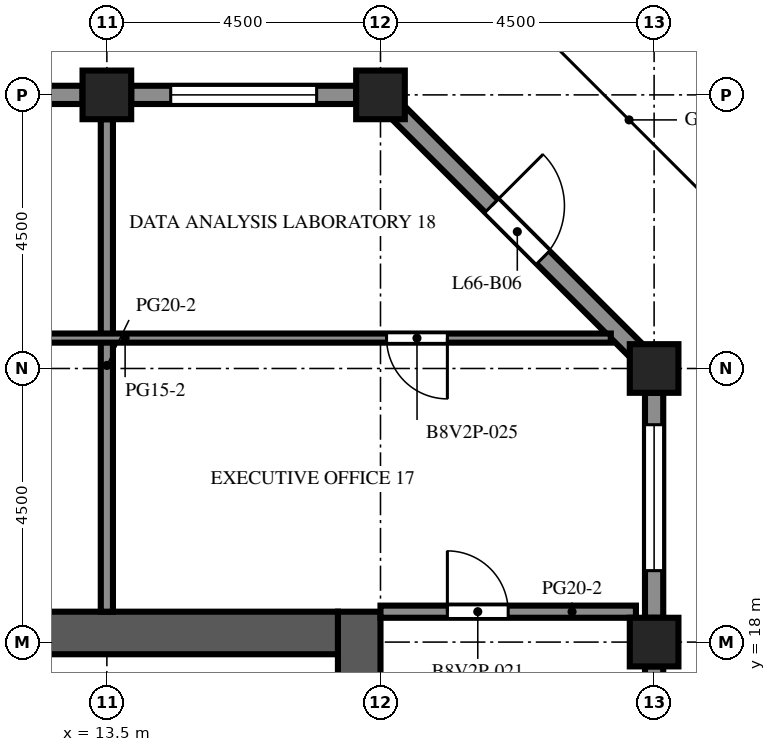
"""IFC4 building model, lengths in metres.
Left out: names, types, materials, properties, quantities, classifications, styles, units other than length and angle.
Written with IfcOpenShell. Run it as: python <this file> out.ifc"""

import sys

from ifc_helpers import new_model, si_unit, direction, frame, frame_2d, origin, origin_2d, place, context, subcontext, project, spatial, rectangle, extrude, element, fill, save


model = new_model("IFC4")
c1 = context("Model", 3, precision=1e-05, world=origin(), true_north=direction((0.0, 1.0)))
c2 = subcontext(c1, "Body", "Model", "MODEL_VIEW")
j1 = project(units=[si_unit("LENGTHUNIT", "METRE"), si_unit("PLANEANGLEUNIT", "RADIAN")], contexts=[c1])
p1 = place(None, origin())
s1 = spatial("IfcSite", under=j1, at=p1, CompositionType="ELEMENT")
p2 = place(p1, origin())
s2 = spatial("IfcBuilding", under=s1, at=p2, CompositionType="ELEMENT")
p3 = place(p2, frame((0.0, 0.0, 290.9)))
s3 = spatial("IfcBuildingStorey", under=s2, at=p3, CompositionType="ELEMENT", Elevation=290.9)
for number, where, z_axis, x_axis in (
    (1, (13.5, 27.0, 0.0), (0.0, 0.0, 1.0), (1.0, 0.0, 0.0)),
    (2, (18.0, 27.0, 0.0), (0.0, 0.0, 1.0), (1.0, 0.0, 0.0)),
    (3, (22.5, 18.0, 0.0), (0.0, 0.0, 1.0), (1.0, 0.0, 0.0)),
    (4, (22.5, 22.5, 0.0), (0.0, 0.0, 1.0), (1.0, 0.0, 0.0)),
):
    element("IfcColumn", number, at=place(p3, frame(where, z_axis=z_axis, x_axis=x_axis)), inside=s3, PredefinedType="COLUMN", context=c2, shape_type="SweptSolid", body=[
        extrude(rectangle(XDim=0.8, YDim=0.8, at=origin_2d()), origin(), (0.0, 0.0, 1.0), 4.1),
    ])
p4 = place(p3, frame((17.65, -9.0, 0.0), z_axis=(0.0, 0.0, 1.0), x_axis=(0.0, 1.0, 0.0)))
e5 = element("IfcWall", 5, at=p4, inside=s3, PredefinedType="SHEAR", context=c2, shape_type="SweptSolid", body=[
    extrude(rectangle(XDim=27.5, YDim=0.7, at=frame_2d((13.75, 0.0))), origin(), (0.0, 0.0, 1.0), 4.1),
])
p5 = place(p4, frame((12.55, 0.0, 0.0)))
e6 = element("IfcOpeningElement", 6, at=p5, cuts=e5, PredefinedType="OPENING", context=c2, shape_type="SweptSolid", body=[
    extrude(rectangle(XDim=2.4, YDim=2.4, at=frame_2d((1.2, 1.2))), frame((0.0, 0.36, 0.0), z_axis=(0.0, -1.0, 0.0), x_axis=(1.0, 0.0, 0.0)), (0.0, 0.0, 1.0), 0.72),
])
p6 = place(p4, frame((6.825, 0.0, 0.0)))
e7 = element("IfcOpeningElement", 7, at=p6, cuts=e5, PredefinedType="OPENING", context=c2, shape_type="SweptSolid", body=[
    extrude(rectangle(XDim=1.2, YDim=2.1, at=frame_2d((0.6, 1.05))), frame((0.0, 0.36, 0.0), z_axis=(0.0, -1.0, 0.0), x_axis=(1.0, 0.0, 0.0)), (0.0, 0.0, 1.0), 0.72),
])
p7 = place(p4, frame((19.475, 0.0, 0.0)))
e8 = element("IfcOpeningElement", 8, at=p7, cuts=e5, PredefinedType="OPENING", context=c2, shape_type="SweptSolid", body=[
    extrude(rectangle(XDim=1.2, YDim=2.1, at=frame_2d((0.6, 1.05))), frame((0.0, 0.36, 0.0), z_axis=(0.0, -1.0, 0.0), x_axis=(1.0, 0.0, 0.0)), (0.0, 0.0, 1.0), 0.72),
])
p8 = place(p3, frame((6.7, 18.15, 0.0), z_axis=(0.0, 0.0, 1.0), x_axis=(1.0, 0.0, 0.0)))
e9 = element("IfcWall", 9, at=p8, inside=s3, PredefinedType="SHEAR", context=c2, shape_type="SweptSolid", body=[
    extrude(rectangle(XDim=10.6, YDim=0.7, at=frame_2d((5.3, 0.0))), origin(), (0.0, 0.0, 1.0), 4.1),
])
p9 = place(p3, frame((22.5, 17.6, 0.0), z_axis=(0.0, 0.0, 1.0), x_axis=(0.0, -1.0, 0.0)))
e10 = element("IfcWall", 10, at=p9, inside=s3, PredefinedType="SOLIDWALL", context=c2, shape_type="SweptSolid", body=[
    extrude(rectangle(XDim=3.7, YDim=0.3, at=frame_2d((1.85, 0.0))), origin(), (0.0, 0.0, 1.0), 2.7),
])
p10 = place(p9, frame((1.35, 0.0, 0.0)))
e11 = element("IfcOpeningElement", 11, at=p10, cuts=e10, PredefinedType="OPENING", context=c2, shape_type="SweptSolid", body=[
    extrude(rectangle(XDim=1.0, YDim=2.2, at=frame_2d((0.5, 1.1))), frame((0.0, 0.16, 0.0), z_axis=(0.0, -1.0, 0.0), x_axis=(1.0, 0.0, 0.0)), (0.0, 0.0, 1.0), 0.32),
])
p11 = place(p3, frame((22.5, 22.1, 0.0), z_axis=(0.0, 0.0, 1.0), x_axis=(0.0, -1.0, 0.0)))
e12 = element("IfcWall", 12, at=p11, inside=s3, PredefinedType="SOLIDWALL", context=c2, shape_type="SweptSolid", body=[
    extrude(rectangle(XDim=3.7, YDim=0.3, at=frame_2d((1.85, 0.0))), origin(), (0.0, 0.0, 1.0), 2.7),
])
p12 = place(p11, frame((0.525, 0.0, 0.8)))
e13 = element("IfcOpeningElement", 13, at=p12, cuts=e12, PredefinedType="OPENING", context=c2, shape_type="SweptSolid", body=[
    extrude(rectangle(XDim=2.4, YDim=1.7, at=frame_2d((1.2, 0.85))), frame((0.0, 0.16, 0.0), z_axis=(0.0, -1.0, 0.0), x_axis=(1.0, 0.0, 0.0)), (0.0, 0.0, 1.0), 0.32),
])
p13 = place(p3, frame((18.294, 26.706, 0.0), z_axis=(0.0, 0.0, 1.0), x_axis=(0.707106781187, -0.707106781187, 0.0)))
e14 = element("IfcWall", 14, at=p13, inside=s3, PredefinedType="SOLIDWALL", context=c2, shape_type="SweptSolid", body=[
    extrude(rectangle(XDim=5.532, YDim=0.3, at=frame_2d((2.766, 0.0))), origin(), (0.0, 0.0, 1.0), 2.7),
])
p14 = place(p13, frame((2.166, 0.0, 0.0)))
e15 = element("IfcOpeningElement", 15, at=p14, cuts=e14, PredefinedType="OPENING", context=c2, shape_type="SweptSolid", body=[
    extrude(rectangle(XDim=1.2, YDim=2.2, at=frame_2d((0.6, 1.1))), frame((0.0, 0.16, 0.0), z_axis=(0.0, -1.0, 0.0), x_axis=(1.0, 0.0, 0.0)), (0.0, 0.0, 1.0), 0.32),
])
p15 = place(p3, frame((13.9, 27.0, 0.0), z_axis=(0.0, 0.0, 1.0), x_axis=(1.0, 0.0, 0.0)))
e16 = element("IfcWall", 16, at=p15, inside=s3, PredefinedType="SOLIDWALL", context=c2, shape_type="SweptSolid", body=[
    extrude(rectangle(XDim=3.7, YDim=0.3, at=frame_2d((1.85, 0.0))), origin(), (0.0, 0.0, 1.0), 2.7),
])
p16 = place(p15, frame((0.65, 0.0, 0.8)))
e17 = element("IfcOpeningElement", 17, at=p16, cuts=e16, PredefinedType="OPENING", context=c2, shape_type="SweptSolid", body=[
    extrude(rectangle(XDim=2.4, YDim=1.7, at=frame_2d((1.2, 0.85))), frame((0.0, 0.16, 0.0), z_axis=(0.0, -1.0, 0.0), x_axis=(1.0, 0.0, 0.0)), (0.0, 0.0, 1.0), 0.32),
])
p17 = place(p3, frame((9.4, 27.0, 0.0), z_axis=(0.0, 0.0, 1.0), x_axis=(1.0, 0.0, 0.0)))
e18 = element("IfcWall", 18, at=p17, inside=s3, PredefinedType="SOLIDWALL", context=c2, shape_type="SweptSolid", body=[
    extrude(rectangle(XDim=3.7, YDim=0.3, at=frame_2d((1.85, 0.0))), origin(), (0.0, 0.0, 1.0), 2.7),
])
p18 = place(p17, frame((1.35, 0.0, 0.0)))
e19 = element("IfcOpeningElement", 19, at=p18, cuts=e18, PredefinedType="OPENING", context=c2, shape_type="SweptSolid", body=[
    extrude(rectangle(XDim=1.0, YDim=2.2, at=frame_2d((0.5, 1.1))), frame((0.0, 0.16, 0.0), z_axis=(0.0, -1.0, 0.0), x_axis=(1.0, 0.0, 0.0)), (0.0, 0.0, 1.0), 0.32),
])
p19 = place(p3, frame((13.5, 18.5, 0.0), z_axis=(0.0, 0.0, 1.0), x_axis=(0.0, 1.0, 0.0)))
e20 = element("IfcWall", 20, at=p19, inside=s3, PredefinedType="PARTITIONING", context=c2, shape_type="SweptSolid", body=[
    extrude(rectangle(XDim=8.1, YDim=0.2, at=frame_2d((4.05, 0.0))), origin(), (0.0, 0.0, 1.0), 3.5),
])
p20 = place(p3, frame((18.0, 18.5, 0.0), z_axis=(0.0, 0.0, 1.0), x_axis=(1.0, 0.0, 0.0)))
e21 = element("IfcWall", 21, at=p20, inside=s3, PredefinedType="PARTITIONING", context=c2, shape_type="SweptSolid", body=[
    extrude(rectangle(XDim=4.201, YDim=0.2, at=frame_2d((2.101, 0.0))), origin(), (0.0, 0.0, 1.0), 3.5),
])
p21 = place(p20, frame((1.1, 0.0, 0.0)))
e22 = element("IfcOpeningElement", 22, at=p21, cuts=e21, PredefinedType="OPENING", context=c2, shape_type="SweptSolid", body=[
    extrude(rectangle(XDim=1.0, YDim=2.1, at=frame_2d((0.5, 1.05))), frame((0.0, 0.11, 0.0), z_axis=(0.0, -1.0, 0.0), x_axis=(1.0, 0.0, 0.0)), (0.0, 0.0, 1.0), 0.22),
])
p22 = place(p3, frame((9.5, 23.0, 0.0), z_axis=(0.0, 0.0, 1.0), x_axis=(1.0, 0.0, 0.0)))
e23 = element("IfcWall", 23, at=p22, inside=s3, PredefinedType="PARTITIONING", context=c2, shape_type="SweptSolid", body=[
    extrude(rectangle(XDim=12.288, YDim=0.15, at=frame_2d((6.144, 0.0))), origin(), (0.0, 0.0, 1.0), 3.5),
])
p23 = place(p22, frame((8.6, 0.0, 0.0)))
e24 = element("IfcOpeningElement", 24, at=p23, cuts=e23, PredefinedType="OPENING", context=c2, shape_type="SweptSolid", body=[
    extrude(rectangle(XDim=1.0, YDim=2.1, at=frame_2d((0.5, 1.05))), frame((0.0, 0.085, 0.0), z_axis=(0.0, -1.0, 0.0), x_axis=(1.0, 0.0, 0.0)), (0.0, 0.0, 1.0), 0.17),
])
p24 = place(p12, origin())
e25 = element("IfcWindow", 25, at=p24, inside=s3, PartitioningType="SINGLE_PANEL", PredefinedType="WINDOW", context=c2, shape_type="SweptSolid", body=[
    extrude(rectangle(XDim=2.4, YDim=1.7, at=frame_2d((1.2, 0.85))), frame((0.0, 0.03, 0.0), z_axis=(0.0, -1.0, 0.0), x_axis=(1.0, 0.0, 0.0)), (0.0, 0.0, 1.0), 0.06),
])
fill(e13, e25)
p25 = place(p14, origin())
e26 = element("IfcDoor", 26, at=p25, inside=s3, OperationType="SINGLE_SWING_LEFT", PredefinedType="DOOR", context=c2, shape_type="SweptSolid", body=[
    extrude(rectangle(XDim=1.2, YDim=2.2, at=frame_2d((0.6, 1.1))), frame((0.0, 0.025, 0.0), z_axis=(0.0, -1.0, 0.0), x_axis=(1.0, 0.0, 0.0)), (0.0, 0.0, 1.0), 0.05),
])
fill(e15, e26)
p26 = place(p16, origin())
e27 = element("IfcWindow", 27, at=p26, inside=s3, PartitioningType="SINGLE_PANEL", PredefinedType="WINDOW", context=c2, shape_type="SweptSolid", body=[
    extrude(rectangle(XDim=2.4, YDim=1.7, at=frame_2d((1.2, 0.85))), frame((0.0, 0.03, 0.0), z_axis=(0.0, -1.0, 0.0), x_axis=(1.0, 0.0, 0.0)), (0.0, 0.0, 1.0), 0.06),
])
fill(e17, e27)
p27 = place(p21, origin())
e28 = element("IfcDoor", 28, at=p27, inside=s3, OperationType="SINGLE_SWING_LEFT", PredefinedType="DOOR", context=c2, shape_type="SweptSolid", body=[
    extrude(rectangle(XDim=1.0, YDim=2.1, at=frame_2d((0.5, 1.05))), frame((0.0, 0.025, 0.0), z_axis=(0.0, -1.0, 0.0), x_axis=(1.0, 0.0, 0.0)), (0.0, 0.0, 1.0), 0.05),
])
fill(e22, e28)
p28 = place(p23, origin())
e29 = element("IfcDoor", 29, at=p28, inside=s3, OperationType="SINGLE_SWING_RIGHT", PredefinedType="DOOR", context=c2, shape_type="SweptSolid", body=[
    extrude(rectangle(XDim=1.0, YDim=2.1, at=frame_2d((0.5, 1.05))), frame((0.0, 0.025, 0.0), z_axis=(0.0, -1.0, 0.0), x_axis=(1.0, 0.0, 0.0)), (0.0, 0.0, 1.0), 0.05),
])
fill(e24, e29)
save(model, sys.argv[1])
